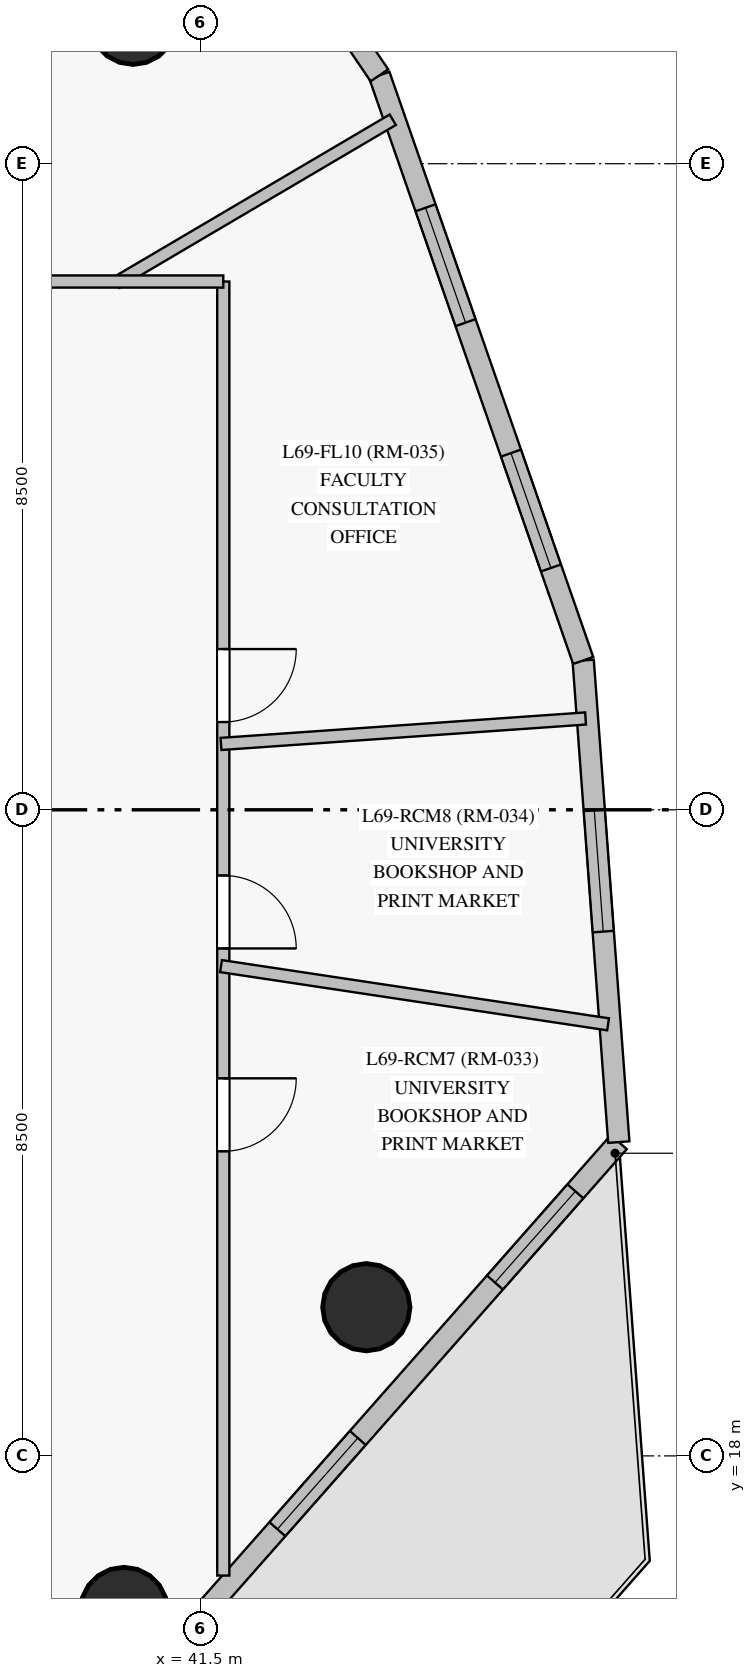
"""IFC4 building model, lengths in metres.
Left out: names, types, materials, properties, quantities, classifications, styles, units other than length and angle.
Written with IfcOpenShell. Run it as: python <this file> out.ifc"""

import sys

from ifc_helpers import new_model, si_unit, direction, frame, frame_2d, origin, origin_with_axes, origin_2d, place, context, subcontext, project, spatial, rectangle, circle, extrude, source, transform, mapped, element, fill, save


model = new_model("IFC4")
c1 = context("Model", 3, precision=1e-05, world=origin(), true_north=direction((0.0, 1.0)))
c2 = subcontext(c1, "Body", "Model", "MODEL_VIEW")
j1 = project(units=[si_unit("LENGTHUNIT", "METRE"), si_unit("PLANEANGLEUNIT", "RADIAN")], contexts=[c1])
p1 = place(None, origin())
s1 = spatial("IfcSite", under=j1, at=p1, CompositionType="ELEMENT")
p2 = place(p1, origin())
s2 = spatial("IfcBuilding", under=s1, at=p2, CompositionType="ELEMENT")
p3 = place(p2, frame((0.0, 0.0, 235.2)))
s3 = spatial("IfcBuildingStorey", under=s2, at=p3, CompositionType="ELEMENT", Elevation=235.2)
m1 = source(origin_with_axes(), c2, "Body", "SweptSolid", [
    extrude(circle(Radius=0.575, at=origin_2d()), origin(), (0.0, 0.0, 1.0), 3.05),
])
for number, where, z_axis, x_axis in (
    (1, (43.682, 19.956, 0.0), (0.0, 0.0, 1.0), (1.0, 0.0, 0.0)),
    (2, (40.613, 36.88, 0.0), (0.0, 0.0, 1.0), (1.0, 0.0, 0.0)),
    (3, (40.494, 15.96, 0.0), (0.0, 0.0, 1.0), (1.0, 0.0, 0.0)),
):
    element("IfcColumn", number, at=place(p3, frame(where, z_axis=z_axis, x_axis=x_axis)), inside=s3, PredefinedType="COLUMN", context=c2, shape_type="MappedRepresentation", body=[
        mapped(m1, transform((0.0, 0.0, 0.0), scale=1.0)),
    ])
p4 = place(p3, frame((34.467, 7.916, 0.0), z_axis=(0.0, 0.0, 1.0), x_axis=(0.661518096325, 0.749929202148, 0.0)))
e4 = element("IfcWall", 4, at=p4, inside=s3, PredefinedType="SOLIDWALL", context=c2, shape_type="SweptSolid", body=[
    extrude(rectangle(XDim=18.952, YDim=0.28, at=frame_2d((9.476, 0.0))), origin(), (0.0, 0.0, 1.0), 2.85),
])
p5 = place(p4, frame((4.831, 0.0, 0.85)))
e5 = element("IfcOpeningElement", 5, at=p5, cuts=e4, PredefinedType="OPENING", context=c2, shape_type="SweptSolid", body=[
    extrude(rectangle(XDim=1.6, YDim=1.6, at=frame_2d((0.8, 0.8))), frame((0.0, 0.15, 0.0), z_axis=(0.0, -1.0, 0.0), x_axis=(1.0, 0.0, 0.0)), (0.0, 0.0, 1.0), 0.3),
])
p6 = place(p4, frame((12.161, 0.0, 0.85)))
e6 = element("IfcOpeningElement", 6, at=p6, cuts=e4, PredefinedType="OPENING", context=c2, shape_type="SweptSolid", body=[
    extrude(rectangle(XDim=1.6, YDim=1.6, at=frame_2d((0.8, 0.8))), frame((0.0, 0.15, 0.0), z_axis=(0.0, -1.0, 0.0), x_axis=(1.0, 0.0, 0.0)), (0.0, 0.0, 1.0), 0.3),
])
p7 = place(p4, frame((16.489, 0.0, 0.85)))
e7 = element("IfcOpeningElement", 7, at=p7, cuts=e4, PredefinedType="OPENING", context=c2, shape_type="SweptSolid", body=[
    extrude(rectangle(XDim=1.6, YDim=1.6, at=frame_2d((0.8, 0.8))), frame((0.0, 0.15, 0.0), z_axis=(0.0, -1.0, 0.0), x_axis=(1.0, 0.0, 0.0)), (0.0, 0.0, 1.0), 0.3),
])
p8 = place(p4, frame((1.844, 0.0, 0.0)))
e8 = element("IfcOpeningElement", 8, at=p8, cuts=e4, PredefinedType="OPENING", context=c2, shape_type="SweptSolid", body=[
    extrude(rectangle(XDim=1.05, YDim=2.12, at=frame_2d((0.525, 1.06))), frame((0.0, 0.15, 0.0), z_axis=(0.0, -1.0, 0.0), x_axis=(1.0, 0.0, 0.0)), (0.0, 0.0, 1.0), 0.3),
])
p9 = place(p3, frame((47.004, 22.128, 0.0), z_axis=(0.0, 0.0, 1.0), x_axis=(-0.073775439927, 0.99727487909, 0.0)))
e9 = element("IfcWall", 9, at=p9, inside=s3, PredefinedType="SOLIDWALL", context=c2, shape_type="SweptSolid", body=[
    extrude(rectangle(XDim=6.354, YDim=0.28, at=frame_2d((3.177, 0.0))), origin(), (0.0, 0.0, 1.0), 2.85),
])
p10 = place(p9, frame((2.777, 0.0, 0.85)))
e10 = element("IfcOpeningElement", 10, at=p10, cuts=e9, PredefinedType="OPENING", context=c2, shape_type="SweptSolid", body=[
    extrude(rectangle(XDim=1.6, YDim=1.6, at=frame_2d((0.8, 0.8))), frame((0.0, 0.15, 0.0), z_axis=(0.0, -1.0, 0.0), x_axis=(1.0, 0.0, 0.0)), (0.0, 0.0, 1.0), 0.3),
])
p11 = place(p3, frame((46.535, 28.465, 0.0), z_axis=(0.0, 0.0, 1.0), x_axis=(-0.328877219654, 0.944372688292, 0.0)))
e11 = element("IfcWall", 11, at=p11, inside=s3, PredefinedType="SOLIDWALL", context=c2, shape_type="SweptSolid", body=[
    extrude(rectangle(XDim=8.152, YDim=0.28, at=frame_2d((4.076, 0.0))), origin(), (0.0, 0.0, 1.0), 2.85),
])
p12 = place(p11, frame((1.289, 0.0, 0.85)))
e12 = element("IfcOpeningElement", 12, at=p12, cuts=e11, PredefinedType="OPENING", context=c2, shape_type="SweptSolid", body=[
    extrude(rectangle(XDim=1.6, YDim=1.6, at=frame_2d((0.8, 0.8))), frame((0.0, 0.15, 0.0), z_axis=(0.0, -1.0, 0.0), x_axis=(1.0, 0.0, 0.0)), (0.0, 0.0, 1.0), 0.3),
])
p13 = place(p11, frame((4.706, 0.0, 0.85)))
e13 = element("IfcOpeningElement", 13, at=p13, cuts=e11, PredefinedType="OPENING", context=c2, shape_type="SweptSolid", body=[
    extrude(rectangle(XDim=1.6, YDim=1.6, at=frame_2d((0.8, 0.8))), frame((0.0, 0.15, 0.0), z_axis=(0.0, -1.0, 0.0), x_axis=(1.0, 0.0, 0.0)), (0.0, 0.0, 1.0), 0.3),
])
p14 = place(p3, frame((43.854, 36.163, 0.0), z_axis=(0.0, 0.0, 1.0), x_axis=(-0.561648682989, 0.827375825666, 0.0)))
e14 = element("IfcWall", 14, at=p14, inside=s3, PredefinedType="SOLIDWALL", context=c2, shape_type="SweptSolid", body=[
    extrude(rectangle(XDim=11.878, YDim=0.28, at=frame_2d((5.939, 0.0))), origin(), (0.0, 0.0, 1.0), 2.85),
])
p15 = place(p14, frame((1.433, 0.0, 0.85)))
e15 = element("IfcOpeningElement", 15, at=p15, cuts=e14, PredefinedType="OPENING", context=c2, shape_type="SweptSolid", body=[
    extrude(rectangle(XDim=1.6, YDim=1.6, at=frame_2d((0.8, 0.8))), frame((0.0, 0.15, 0.0), z_axis=(0.0, -1.0, 0.0), x_axis=(1.0, 0.0, 0.0)), (0.0, 0.0, 1.0), 0.3),
])
p16 = place(p14, frame((5.139, 0.0, 0.85)))
e16 = element("IfcOpeningElement", 16, at=p16, cuts=e14, PredefinedType="OPENING", context=c2, shape_type="SweptSolid", body=[
    extrude(rectangle(XDim=1.6, YDim=1.6, at=frame_2d((0.8, 0.8))), frame((0.0, 0.15, 0.0), z_axis=(0.0, -1.0, 0.0), x_axis=(1.0, 0.0, 0.0)), (0.0, 0.0, 1.0), 0.3),
])
p17 = place(p14, frame((8.845, 0.0, 0.85)))
e17 = element("IfcOpeningElement", 17, at=p17, cuts=e14, PredefinedType="OPENING", context=c2, shape_type="SweptSolid", body=[
    extrude(rectangle(XDim=1.6, YDim=1.6, at=frame_2d((0.8, 0.8))), frame((0.0, 0.15, 0.0), z_axis=(0.0, -1.0, 0.0), x_axis=(1.0, 0.0, 0.0)), (0.0, 0.0, 1.0), 0.3),
])
p18 = place(p3, frame((41.8, 33.45, 0.0), z_axis=(0.0, 0.0, 1.0), x_axis=(0.0, -1.0, 0.0)))
e18 = element("IfcWall", 18, at=p18, inside=s3, PredefinedType="PARTITIONING", context=c2, shape_type="SweptSolid", body=[
    extrude(rectangle(XDim=17.024, YDim=0.16, at=frame_2d((8.512, 0.0))), origin(), (0.0, 0.0, 1.0), 2.3),
])
p19 = place(p18, frame((10.483, 0.0, 0.0)))
e19 = element("IfcOpeningElement", 19, at=p19, cuts=e18, PredefinedType="OPENING", context=c2, shape_type="SweptSolid", body=[
    extrude(rectangle(XDim=0.96, YDim=2.15, at=frame_2d((0.48, 1.075))), frame((0.0, 0.09, 0.0), z_axis=(0.0, -1.0, 0.0), x_axis=(1.0, 0.0, 0.0)), (0.0, 0.0, 1.0), 0.18),
])
p20 = place(p18, frame((7.814, 0.0, 0.0)))
e20 = element("IfcOpeningElement", 20, at=p20, cuts=e18, PredefinedType="OPENING", context=c2, shape_type="SweptSolid", body=[
    extrude(rectangle(XDim=0.96, YDim=2.15, at=frame_2d((0.48, 1.075))), frame((0.0, 0.09, 0.0), z_axis=(0.0, -1.0, 0.0), x_axis=(1.0, 0.0, 0.0)), (0.0, 0.0, 1.0), 0.18),
])
p21 = place(p18, frame((4.835, 0.0, 0.0)))
e21 = element("IfcOpeningElement", 21, at=p21, cuts=e18, PredefinedType="OPENING", context=c2, shape_type="SweptSolid", body=[
    extrude(rectangle(XDim=0.96, YDim=2.15, at=frame_2d((0.48, 1.075))), frame((0.0, 0.09, 0.0), z_axis=(0.0, -1.0, 0.0), x_axis=(1.0, 0.0, 0.0)), (0.0, 0.0, 1.0), 0.18),
])
p22 = place(p3, frame((41.77, 24.444, 0.0), z_axis=(0.0, 0.0, 1.0), x_axis=(0.988877502594, -0.148732258984, 0.0)))
e22 = element("IfcWall", 22, at=p22, inside=s3, PredefinedType="PARTITIONING", context=c2, shape_type="SweptSolid", body=[
    extrude(rectangle(XDim=5.149, YDim=0.16, at=frame_2d((2.575, 0.0))), origin(), (0.0, 0.0, 1.0), 2.85),
])
p23 = place(p3, frame((41.77, 27.366, 0.0), z_axis=(0.0, 0.0, 1.0), x_axis=(0.997573870871, 0.069615890103, 0.0)))
e23 = element("IfcWall", 23, at=p23, inside=s3, PredefinedType="PARTITIONING", context=c2, shape_type="SweptSolid", body=[
    extrude(rectangle(XDim=4.808, YDim=0.16, at=frame_2d((2.404, 0.0))), origin(), (0.0, 0.0, 1.0), 2.85),
])
p24 = place(p3, frame((40.391, 33.435, 0.0), z_axis=(0.0, 0.0, 1.0), x_axis=(0.861632369313, 0.507532915338, 0.0)))
e24 = element("IfcWall", 24, at=p24, inside=s3, PredefinedType="PARTITIONING", context=c2, shape_type="SweptSolid", body=[
    extrude(rectangle(XDim=4.223, YDim=0.16, at=frame_2d((2.111, 0.0))), origin(), (0.0, 0.0, 1.0), 2.85),
])
p25 = place(p3, frame((37.682, 33.45, 0.0), z_axis=(0.0, 0.0, 1.0), x_axis=(1.0, 0.0, 0.0)))
e25 = element("IfcWall", 25, at=p25, inside=s3, PredefinedType="PARTITIONING", context=c2, shape_type="SweptSolid", body=[
    extrude(rectangle(XDim=4.118, YDim=0.16, at=frame_2d((2.059, 0.0))), origin(), (0.0, 0.0, 1.0), 2.85),
])
m2 = source(origin_with_axes(), c2, "Body", "SweptSolid", [
    extrude(rectangle(XDim=1.6, YDim=1.6, at=frame_2d((0.8, 0.8))), frame((0.0, 0.03, 0.0), z_axis=(0.0, -1.0, 0.0), x_axis=(1.0, 0.0, 0.0)), (0.0, 0.0, 1.0), 0.06),
])
p26 = place(p6, origin())
e26 = element("IfcWindow", 26, at=p26, inside=s3, PartitioningType="SINGLE_PANEL", PredefinedType="WINDOW", context=c2, shape_type="MappedRepresentation", body=[
    mapped(m2, transform((0.0, 0.0, 0.0), scale=1.0)),
])
fill(e6, e26)
p27 = place(p7, origin())
e27 = element("IfcWindow", 27, at=p27, inside=s3, PartitioningType="SINGLE_PANEL", PredefinedType="WINDOW", context=c2, shape_type="MappedRepresentation", body=[
    mapped(m2, transform((0.0, 0.0, 0.0), scale=1.0)),
])
fill(e7, e27)
p28 = place(p10, origin())
e28 = element("IfcWindow", 28, at=p28, inside=s3, PartitioningType="SINGLE_PANEL", PredefinedType="WINDOW", context=c2, shape_type="MappedRepresentation", body=[
    mapped(m2, transform((0.0, 0.0, 0.0), scale=1.0)),
])
fill(e10, e28)
p29 = place(p12, origin())
e29 = element("IfcWindow", 29, at=p29, inside=s3, PartitioningType="SINGLE_PANEL", PredefinedType="WINDOW", context=c2, shape_type="MappedRepresentation", body=[
    mapped(m2, transform((0.0, 0.0, 0.0), scale=1.0)),
])
fill(e12, e29)
p30 = place(p13, origin())
e30 = element("IfcWindow", 30, at=p30, inside=s3, PartitioningType="SINGLE_PANEL", PredefinedType="WINDOW", context=c2, shape_type="MappedRepresentation", body=[
    mapped(m2, transform((0.0, 0.0, 0.0), scale=1.0)),
])
fill(e13, e30)
m3 = source(origin_with_axes(), c2, "Body", "SweptSolid", [
    extrude(rectangle(XDim=0.96, YDim=2.15, at=frame_2d((0.48, 1.075))), frame((0.0, 0.025, 0.0), z_axis=(0.0, -1.0, 0.0), x_axis=(1.0, 0.0, 0.0)), (0.0, 0.0, 1.0), 0.05),
])
p31 = place(p19, origin())
e31 = element("IfcDoor", 31, at=p31, inside=s3, OperationType="SINGLE_SWING_LEFT", PredefinedType="DOOR", context=c2, shape_type="MappedRepresentation", body=[
    mapped(m3, transform((0.0, 0.0, 0.0), scale=1.0)),
])
fill(e19, e31)
p32 = place(p20, origin())
e32 = element("IfcDoor", 32, at=p32, inside=s3, OperationType="SINGLE_SWING_RIGHT", PredefinedType="DOOR", context=c2, shape_type="MappedRepresentation", body=[
    mapped(m3, transform((0.0, 0.0, 0.0), scale=1.0)),
])
fill(e20, e32)
p33 = place(p21, origin())
e33 = element("IfcDoor", 33, at=p33, inside=s3, OperationType="SINGLE_SWING_LEFT", PredefinedType="DOOR", context=c2, shape_type="MappedRepresentation", body=[
    mapped(m3, transform((0.0, 0.0, 0.0), scale=1.0)),
])
fill(e21, e33)
save(model, sys.argv[1])
